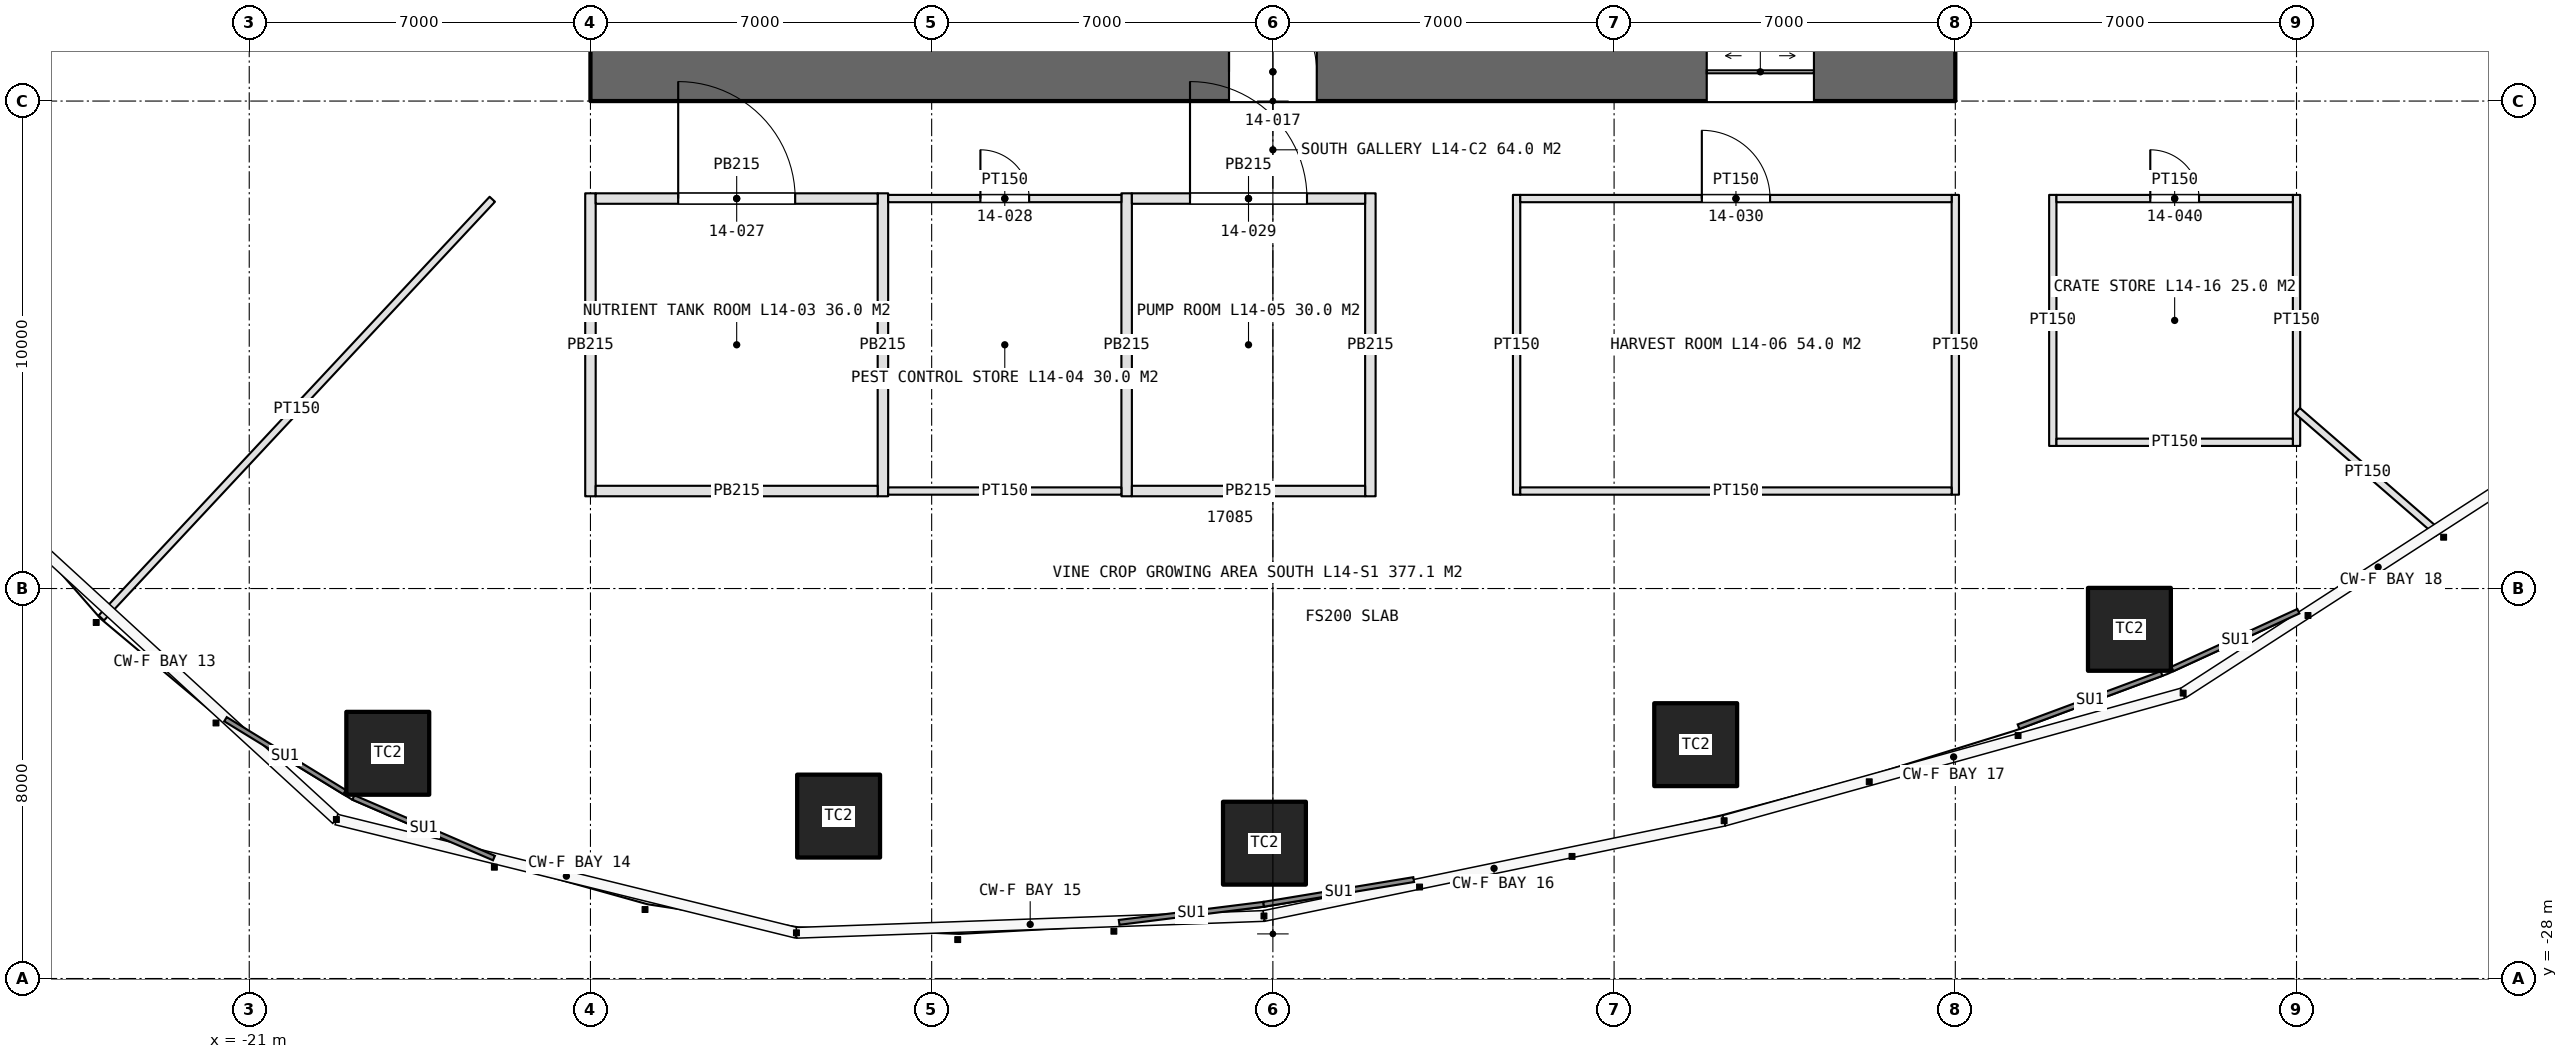
"""IFC4 building model, lengths in metres.
Left out: names, types, materials, properties, quantities, classifications, styles, units other than length and angle.
Written with IfcOpenShell. Run it as: python <this file> out.ifc"""

import sys

from ifc_helpers import new_model, si_unit, direction, frame, frame_2d, origin, origin_2d, place, context, subcontext, project, spatial, rectangle, extrude, element, fill, save


model = new_model("IFC4")
c1 = context("Model", 3, precision=1e-05, world=origin(), true_north=direction((0.0, 1.0)))
c2 = subcontext(c1, "Body", "Model", "MODEL_VIEW")
j1 = project(units=[si_unit("LENGTHUNIT", "METRE"), si_unit("PLANEANGLEUNIT", "RADIAN")], contexts=[c1])
p1 = place(None, origin())
s1 = spatial("IfcSite", under=j1, at=p1, CompositionType="ELEMENT")
p2 = place(p1, origin())
s2 = spatial("IfcBuilding", under=s1, at=p2, CompositionType="ELEMENT")
p3 = place(p2, frame((0.0, 0.0, 70.0)))
s3 = spatial("IfcBuildingStorey", under=s2, at=p3, CompositionType="ELEMENT", Elevation=70.0)
p4 = place(p3, frame((-14.0, -9.4, 0.0), z_axis=(0.0, 0.0, 1.0), x_axis=(1.0, 0.0, 0.0)))
e1 = element("IfcWall", 1, at=p4, inside=s3, PredefinedType="SHEAR", context=c2, shape_type="SweptSolid", body=[
    extrude(rectangle(XDim=28.0, YDim=1.2, at=frame_2d((14.0, 0.0))), origin(), (0.0, 0.0, 1.0), 5.0),
])
p5 = place(p4, frame((13.1, 0.0, 0.0)))
e2 = element("IfcOpeningElement", 2, at=p5, cuts=e1, PredefinedType="OPENING", context=c2, shape_type="SweptSolid", body=[
    extrude(rectangle(XDim=1.8, YDim=2.4, at=frame_2d((0.9, 1.2))), frame((0.0, 0.61, 0.0), z_axis=(0.0, -1.0, 0.0), x_axis=(1.0, 0.0, 0.0)), (0.0, 0.0, 1.0), 1.22),
])
p6 = place(p4, frame((22.9, 0.0, 0.0)))
e3 = element("IfcOpeningElement", 3, at=p6, cuts=e1, PredefinedType="OPENING", context=c2, shape_type="SweptSolid", body=[
    extrude(rectangle(XDim=2.2, YDim=2.7, at=frame_2d((1.1, 1.35))), frame((0.0, 0.61, 0.0), z_axis=(0.0, -1.0, 0.0), x_axis=(1.0, 0.0, 0.0)), (0.0, 0.0, 1.0), 1.22),
])
for number, where, z_axis, x_axis in (
    (4, (-18.158, -23.38, 0.0), (0.0, 0.0, 1.0), (1.0, 0.0, 0.0)),
    (5, (-8.909, -24.668, 0.0), (0.0, 0.0, 1.0), (1.0, 0.0, 0.0)),
    (6, (-0.173, -25.224, 0.0), (0.0, 0.0, 1.0), (1.0, 0.0, 0.0)),
    (7, (8.674, -23.203, 0.0), (0.0, 0.0, 1.0), (1.0, 0.0, 0.0)),
    (8, (17.572, -20.837, 0.0), (0.0, 0.0, 1.0), (1.0, 0.0, 0.0)),
):
    element("IfcColumn", number, at=place(p3, frame(where, z_axis=z_axis, x_axis=x_axis)), inside=s3, PredefinedType="COLUMN", context=c2, shape_type="SweptSolid", body=[
        extrude(rectangle(XDim=1.7, YDim=1.7, at=origin_2d()), origin(), (0.0, 0.0, 1.0), 5.0),
    ])
for number, where, z_axis, x_axis in (
    (9, (-14.0, -11.893, 0.0), (0.0, 0.0, 1.0), (0.0, -1.0, 0.0)),
    (10, (-8.0, -11.893, 0.0), (0.0, 0.0, 1.0), (0.0, -1.0, 0.0)),
    (11, (-3.0, -11.893, 0.0), (0.0, 0.0, 1.0), (0.0, -1.0, 0.0)),
    (12, (2.0, -11.893, 0.0), (0.0, 0.0, 1.0), (0.0, -1.0, 0.0)),
):
    element("IfcWall", number, at=place(p3, frame(where, z_axis=z_axis, x_axis=x_axis)), inside=s3, PredefinedType="PARTITIONING", context=c2, shape_type="SweptSolid", body=[
        extrude(rectangle(XDim=6.215, YDim=0.215, at=frame_2d((3.107, 0.0))), origin(), (0.0, 0.0, 1.0), 3.6),
    ])
p7 = place(p3, frame((-13.893, -12.0, 0.0), z_axis=(0.0, 0.0, 1.0), x_axis=(1.0, 0.0, 0.0)))
e13 = element("IfcWall", 13, at=p7, inside=s3, PredefinedType="PARTITIONING", context=c2, shape_type="SweptSolid", body=[
    extrude(rectangle(XDim=5.785, YDim=0.215, at=frame_2d((2.893, 0.0))), origin(), (0.0, 0.0, 1.0), 3.6),
])
p8 = place(p7, frame((1.692, 0.0, 0.0)))
e14 = element("IfcOpeningElement", 14, at=p8, cuts=e13, PredefinedType="OPENING", context=c2, shape_type="SweptSolid", body=[
    extrude(rectangle(XDim=2.4, YDim=2.4, at=frame_2d((1.2, 1.2))), frame((0.0, 0.118, 0.0), z_axis=(0.0, -1.0, 0.0), x_axis=(1.0, 0.0, 0.0)), (0.0, 0.0, 1.0), 0.235),
])
p9 = place(p3, frame((-13.893, -18.0, 0.0), z_axis=(0.0, 0.0, 1.0), x_axis=(1.0, 0.0, 0.0)))
e15 = element("IfcWall", 15, at=p9, inside=s3, PredefinedType="PARTITIONING", context=c2, shape_type="SweptSolid", body=[
    extrude(rectangle(XDim=5.785, YDim=0.215, at=frame_2d((2.893, 0.0))), origin(), (0.0, 0.0, 1.0), 3.6),
])
p10 = place(p3, frame((-7.893, -12.0, 0.0), z_axis=(0.0, 0.0, 1.0), x_axis=(1.0, 0.0, 0.0)))
e16 = element("IfcWall", 16, at=p10, inside=s3, PredefinedType="PARTITIONING", context=c2, shape_type="SweptSolid", body=[
    extrude(rectangle(XDim=4.785, YDim=0.15, at=frame_2d((2.393, 0.0))), origin(), (0.0, 0.0, 1.0), 3.6),
])
p11 = place(p10, frame((1.893, 0.0, 0.0)))
e17 = element("IfcOpeningElement", 17, at=p11, cuts=e16, PredefinedType="OPENING", context=c2, shape_type="SweptSolid", body=[
    extrude(rectangle(XDim=1.0, YDim=2.2, at=frame_2d((0.5, 1.1))), frame((0.0, 0.085, 0.0), z_axis=(0.0, -1.0, 0.0), x_axis=(1.0, 0.0, 0.0)), (0.0, 0.0, 1.0), 0.17),
])
p12 = place(p3, frame((-7.893, -18.0, 0.0), z_axis=(0.0, 0.0, 1.0), x_axis=(1.0, 0.0, 0.0)))
e18 = element("IfcWall", 18, at=p12, inside=s3, PredefinedType="PARTITIONING", context=c2, shape_type="SweptSolid", body=[
    extrude(rectangle(XDim=4.785, YDim=0.15, at=frame_2d((2.393, 0.0))), origin(), (0.0, 0.0, 1.0), 3.6),
])
p13 = place(p3, frame((-2.893, -12.0, 0.0), z_axis=(0.0, 0.0, 1.0), x_axis=(1.0, 0.0, 0.0)))
e19 = element("IfcWall", 19, at=p13, inside=s3, PredefinedType="PARTITIONING", context=c2, shape_type="SweptSolid", body=[
    extrude(rectangle(XDim=4.785, YDim=0.215, at=frame_2d((2.393, 0.0))), origin(), (0.0, 0.0, 1.0), 3.6),
])
p14 = place(p13, frame((1.192, 0.0, 0.0)))
e20 = element("IfcOpeningElement", 20, at=p14, cuts=e19, PredefinedType="OPENING", context=c2, shape_type="SweptSolid", body=[
    extrude(rectangle(XDim=2.4, YDim=2.4, at=frame_2d((1.2, 1.2))), frame((0.0, 0.118, 0.0), z_axis=(0.0, -1.0, 0.0), x_axis=(1.0, 0.0, 0.0)), (0.0, 0.0, 1.0), 0.235),
])
p15 = place(p3, frame((-2.893, -18.0, 0.0), z_axis=(0.0, 0.0, 1.0), x_axis=(1.0, 0.0, 0.0)))
e21 = element("IfcWall", 21, at=p15, inside=s3, PredefinedType="PARTITIONING", context=c2, shape_type="SweptSolid", body=[
    extrude(rectangle(XDim=4.785, YDim=0.215, at=frame_2d((2.393, 0.0))), origin(), (0.0, 0.0, 1.0), 3.6),
])
for number, where, z_axis, x_axis in (
    (22, (5.0, -11.925, 0.0), (0.0, 0.0, 1.0), (0.0, -1.0, 0.0)),
    (23, (14.0, -11.925, 0.0), (0.0, 0.0, 1.0), (0.0, -1.0, 0.0)),
):
    element("IfcWall", number, at=place(p3, frame(where, z_axis=z_axis, x_axis=x_axis)), inside=s3, PredefinedType="PARTITIONING", context=c2, shape_type="SweptSolid", body=[
        extrude(rectangle(XDim=6.15, YDim=0.15, at=frame_2d((3.075, 0.0))), origin(), (0.0, 0.0, 1.0), 3.6),
    ])
p16 = place(p3, frame((5.075, -12.0, 0.0), z_axis=(0.0, 0.0, 1.0), x_axis=(1.0, 0.0, 0.0)))
e24 = element("IfcWall", 24, at=p16, inside=s3, PredefinedType="PARTITIONING", context=c2, shape_type="SweptSolid", body=[
    extrude(rectangle(XDim=8.85, YDim=0.15, at=frame_2d((4.425, 0.0))), origin(), (0.0, 0.0, 1.0), 3.6),
])
p17 = place(p16, frame((3.725, 0.0, 0.0)))
e25 = element("IfcOpeningElement", 25, at=p17, cuts=e24, PredefinedType="OPENING", context=c2, shape_type="SweptSolid", body=[
    extrude(rectangle(XDim=1.4, YDim=2.4, at=frame_2d((0.7, 1.2))), frame((0.0, 0.085, 0.0), z_axis=(0.0, -1.0, 0.0), x_axis=(1.0, 0.0, 0.0)), (0.0, 0.0, 1.0), 0.17),
])
p18 = place(p3, frame((5.075, -18.0, 0.0), z_axis=(0.0, 0.0, 1.0), x_axis=(1.0, 0.0, 0.0)))
e26 = element("IfcWall", 26, at=p18, inside=s3, PredefinedType="PARTITIONING", context=c2, shape_type="SweptSolid", body=[
    extrude(rectangle(XDim=8.85, YDim=0.15, at=frame_2d((4.425, 0.0))), origin(), (0.0, 0.0, 1.0), 3.6),
])
for number, where, z_axis, x_axis in (
    (27, (16.0, -11.925, 0.0), (0.0, 0.0, 1.0), (0.0, -1.0, 0.0)),
    (28, (21.0, -11.925, 0.0), (0.0, 0.0, 1.0), (0.0, -1.0, 0.0)),
):
    element("IfcWall", number, at=place(p3, frame(where, z_axis=z_axis, x_axis=x_axis)), inside=s3, PredefinedType="PARTITIONING", context=c2, shape_type="SweptSolid", body=[
        extrude(rectangle(XDim=5.15, YDim=0.15, at=frame_2d((2.575, 0.0))), origin(), (0.0, 0.0, 1.0), 3.6),
    ])
p19 = place(p3, frame((16.075, -12.0, 0.0), z_axis=(0.0, 0.0, 1.0), x_axis=(1.0, 0.0, 0.0)))
e29 = element("IfcWall", 29, at=p19, inside=s3, PredefinedType="PARTITIONING", context=c2, shape_type="SweptSolid", body=[
    extrude(rectangle(XDim=4.85, YDim=0.15, at=frame_2d((2.425, 0.0))), origin(), (0.0, 0.0, 1.0), 3.6),
])
p20 = place(p19, frame((1.925, 0.0, 0.0)))
e30 = element("IfcOpeningElement", 30, at=p20, cuts=e29, PredefinedType="OPENING", context=c2, shape_type="SweptSolid", body=[
    extrude(rectangle(XDim=1.0, YDim=2.2, at=frame_2d((0.5, 1.1))), frame((0.0, 0.085, 0.0), z_axis=(0.0, -1.0, 0.0), x_axis=(1.0, 0.0, 0.0)), (0.0, 0.0, 1.0), 0.17),
])
p21 = place(p3, frame((16.075, -17.0, 0.0), z_axis=(0.0, 0.0, 1.0), x_axis=(1.0, 0.0, 0.0)))
e31 = element("IfcWall", 31, at=p21, inside=s3, PredefinedType="PARTITIONING", context=c2, shape_type="SweptSolid", body=[
    extrude(rectangle(XDim=4.85, YDim=0.15, at=frame_2d((2.425, 0.0))), origin(), (0.0, 0.0, 1.0), 3.6),
])
p22 = place(p3, frame((-16.014, -12.015, 0.0), z_axis=(0.0, 0.0, 1.0), x_axis=(-0.682522513656, -0.730864569091, 0.0)))
e32 = element("IfcWall", 32, at=p22, inside=s3, PredefinedType="PARTITIONING", context=c2, shape_type="SweptSolid", body=[
    extrude(rectangle(XDim=11.752, YDim=0.15, at=frame_2d((5.876, 0.0))), origin(), (0.0, 0.0, 1.0), 3.6),
])
p23 = place(p3, frame((21.02, -16.354, 0.0), z_axis=(0.0, 0.0, 1.0), x_axis=(0.755425653008, -0.655234372402, 0.0)))
e33 = element("IfcWall", 33, at=p23, inside=s3, PredefinedType="PARTITIONING", context=c2, shape_type="SweptSolid", body=[
    extrude(rectangle(XDim=3.823, YDim=0.15, at=frame_2d((1.912, 0.0))), origin(), (0.0, 0.0, 1.0), 3.6),
])
p24 = place(p5, origin())
e34 = element("IfcDoor", 34, at=p24, inside=s3, OperationType="DOUBLE_DOOR_SINGLE_SWING", PredefinedType="DOOR", context=c2, shape_type="SweptSolid", body=[
    extrude(rectangle(XDim=1.8, YDim=2.4, at=frame_2d((0.9, 1.2))), frame((0.0, 0.025, 0.0), z_axis=(0.0, -1.0, 0.0), x_axis=(1.0, 0.0, 0.0)), (0.0, 0.0, 1.0), 0.05),
])
fill(e2, e34)
p25 = place(p6, origin())
e35 = element("IfcDoor", 35, at=p25, inside=s3, OperationType="DOUBLE_DOOR_SLIDING", PredefinedType="DOOR", context=c2, shape_type="SweptSolid", body=[
    extrude(rectangle(XDim=2.2, YDim=2.7, at=frame_2d((1.1, 1.35))), frame((0.0, 0.025, 0.0), z_axis=(0.0, -1.0, 0.0), x_axis=(1.0, 0.0, 0.0)), (0.0, 0.0, 1.0), 0.05),
])
fill(e3, e35)
p26 = place(p8, origin())
e36 = element("IfcDoor", 36, at=p26, inside=s3, OperationType="DOUBLE_DOOR_SINGLE_SWING", PredefinedType="DOOR", context=c2, shape_type="SweptSolid", body=[
    extrude(rectangle(XDim=2.4, YDim=2.4, at=frame_2d((1.2, 1.2))), frame((0.0, 0.025, 0.0), z_axis=(0.0, -1.0, 0.0), x_axis=(1.0, 0.0, 0.0)), (0.0, 0.0, 1.0), 0.05),
])
fill(e14, e36)
p27 = place(p11, origin())
e37 = element("IfcDoor", 37, at=p27, inside=s3, OperationType="SINGLE_SWING_LEFT", PredefinedType="DOOR", context=c2, shape_type="SweptSolid", body=[
    extrude(rectangle(XDim=1.0, YDim=2.2, at=frame_2d((0.5, 1.1))), frame((0.0, 0.025, 0.0), z_axis=(0.0, -1.0, 0.0), x_axis=(1.0, 0.0, 0.0)), (0.0, 0.0, 1.0), 0.05),
])
fill(e17, e37)
p28 = place(p14, origin())
e38 = element("IfcDoor", 38, at=p28, inside=s3, OperationType="DOUBLE_DOOR_SINGLE_SWING", PredefinedType="DOOR", context=c2, shape_type="SweptSolid", body=[
    extrude(rectangle(XDim=2.4, YDim=2.4, at=frame_2d((1.2, 1.2))), frame((0.0, 0.025, 0.0), z_axis=(0.0, -1.0, 0.0), x_axis=(1.0, 0.0, 0.0)), (0.0, 0.0, 1.0), 0.05),
])
fill(e20, e38)
p29 = place(p17, origin())
e39 = element("IfcDoor", 39, at=p29, inside=s3, OperationType="DOUBLE_DOOR_DOUBLE_SWING", PredefinedType="DOOR", context=c2, shape_type="SweptSolid", body=[
    extrude(rectangle(XDim=1.4, YDim=2.4, at=frame_2d((0.7, 1.2))), frame((0.0, 0.025, 0.0), z_axis=(0.0, -1.0, 0.0), x_axis=(1.0, 0.0, 0.0)), (0.0, 0.0, 1.0), 0.05),
])
fill(e25, e39)
p30 = place(p20, origin())
e40 = element("IfcDoor", 40, at=p30, inside=s3, OperationType="SINGLE_SWING_LEFT", PredefinedType="DOOR", context=c2, shape_type="SweptSolid", body=[
    extrude(rectangle(XDim=1.0, YDim=2.2, at=frame_2d((0.5, 1.1))), frame((0.0, 0.025, 0.0), z_axis=(0.0, -1.0, 0.0), x_axis=(1.0, 0.0, 0.0)), (0.0, 0.0, 1.0), 0.05),
])
fill(e30, e40)
save(model, sys.argv[1])
